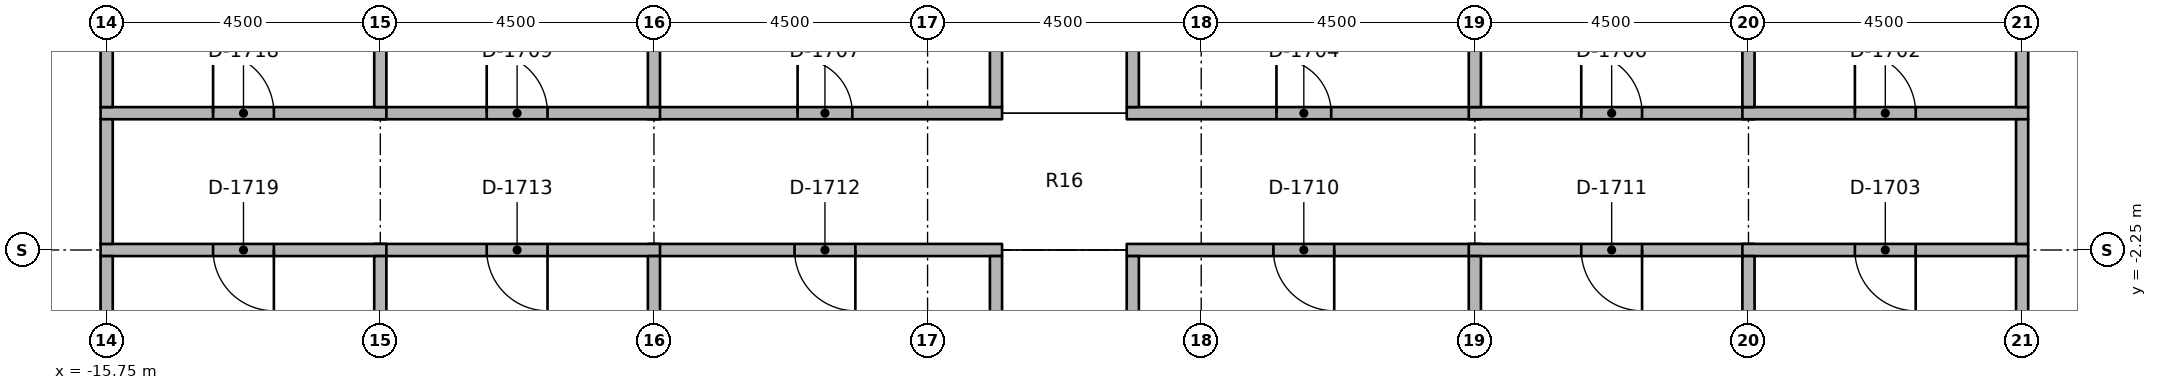
"""IFC4 building model, lengths in metres.
Left out: names, types, materials, properties, quantities, classifications, styles, units other than length and angle.
Written with IfcOpenShell. Run it as: python <this file> out.ifc"""

import sys

from ifc_helpers import new_model, si_unit, direction, frame, frame_2d, origin, place, context, subcontext, project, spatial, rectangle, extrude, element, fill, save


model = new_model("IFC4")
c1 = context("Model", 3, precision=1e-05, world=origin(), true_north=direction((0.0, 1.0)))
c2 = subcontext(c1, "Body", "Model", "MODEL_VIEW")
j1 = project(units=[si_unit("LENGTHUNIT", "METRE"), si_unit("PLANEANGLEUNIT", "RADIAN")], contexts=[c1])
p1 = place(None, origin())
s1 = spatial("IfcSite", under=j1, at=p1, CompositionType="ELEMENT")
p2 = place(p1, origin())
s2 = spatial("IfcBuilding", under=s1, at=p2, CompositionType="ELEMENT")
p3 = place(p2, frame((0.0, 0.0, 160.0)))
s3 = spatial("IfcBuildingStorey", under=s2, at=p3, CompositionType="ELEMENT", Elevation=160.0)
p4 = place(p3, frame((1.025, 0.0, 0.0), z_axis=(0.0, 0.0, 1.0), x_axis=(1.0, 0.0, 0.0)))
e1 = element("IfcWall", 1, at=p4, inside=s3, PredefinedType="PARTITIONING", context=c2, shape_type="SweptSolid", body=[
    extrude(rectangle(XDim=5.825, YDim=0.2, at=frame_2d((2.913, 0.0))), origin(), (0.0, 0.0, 1.0), 2.75),
])
p5 = place(p4, frame((2.462, 0.0, 0.0)))
e2 = element("IfcOpeningElement", 2, at=p5, cuts=e1, PredefinedType="OPENING", context=c2, shape_type="SweptSolid", body=[
    extrude(rectangle(XDim=0.9, YDim=2.1, at=frame_2d((0.45, 1.05))), frame((0.0, 0.11, 0.0), z_axis=(0.0, -1.0, 0.0), x_axis=(1.0, 0.0, 0.0)), (0.0, 0.0, 1.0), 0.22),
])
p6 = place(p3, frame((6.65, 0.0, 0.0), z_axis=(0.0, 0.0, 1.0), x_axis=(1.0, 0.0, 0.0)))
e3 = element("IfcWall", 3, at=p6, inside=s3, PredefinedType="PARTITIONING", context=c2, shape_type="SweptSolid", body=[
    extrude(rectangle(XDim=4.7, YDim=0.2, at=frame_2d((2.35, 0.0))), origin(), (0.0, 0.0, 1.0), 2.75),
])
p7 = place(p6, frame((1.85, 0.0, 0.0)))
e4 = element("IfcOpeningElement", 4, at=p7, cuts=e3, PredefinedType="OPENING", context=c2, shape_type="SweptSolid", body=[
    extrude(rectangle(XDim=1.0, YDim=2.1, at=frame_2d((0.5, 1.05))), frame((0.0, 0.11, 0.0), z_axis=(0.0, -1.0, 0.0), x_axis=(1.0, 0.0, 0.0)), (0.0, 0.0, 1.0), 0.22),
])
p8 = place(p3, frame((-6.85, 0.0, 0.0), z_axis=(0.0, 0.0, 1.0), x_axis=(1.0, 0.0, 0.0)))
e5 = element("IfcWall", 5, at=p8, inside=s3, PredefinedType="PARTITIONING", context=c2, shape_type="SweptSolid", body=[
    extrude(rectangle(XDim=5.825, YDim=0.2, at=frame_2d((2.913, 0.0))), origin(), (0.0, 0.0, 1.0), 2.75),
])
p9 = place(p8, frame((2.462, 0.0, 0.0)))
e6 = element("IfcOpeningElement", 6, at=p9, cuts=e5, PredefinedType="OPENING", context=c2, shape_type="SweptSolid", body=[
    extrude(rectangle(XDim=0.9, YDim=2.1, at=frame_2d((0.45, 1.05))), frame((0.0, 0.11, 0.0), z_axis=(0.0, -1.0, 0.0), x_axis=(1.0, 0.0, 0.0)), (0.0, 0.0, 1.0), 0.22),
])
p10 = place(p3, frame((-11.35, 0.0, 0.0), z_axis=(0.0, 0.0, 1.0), x_axis=(1.0, 0.0, 0.0)))
e7 = element("IfcWall", 7, at=p10, inside=s3, PredefinedType="PARTITIONING", context=c2, shape_type="SweptSolid", body=[
    extrude(rectangle(XDim=4.7, YDim=0.2, at=frame_2d((2.35, 0.0))), origin(), (0.0, 0.0, 1.0), 2.75),
])
p11 = place(p10, frame((1.85, 0.0, 0.0)))
e8 = element("IfcOpeningElement", 8, at=p11, cuts=e7, PredefinedType="OPENING", context=c2, shape_type="SweptSolid", body=[
    extrude(rectangle(XDim=1.0, YDim=2.1, at=frame_2d((0.5, 1.05))), frame((0.0, 0.11, 0.0), z_axis=(0.0, -1.0, 0.0), x_axis=(1.0, 0.0, 0.0)), (0.0, 0.0, 1.0), 0.22),
])
p12 = place(p3, frame((6.85, -2.25, 0.0), z_axis=(0.0, 0.0, 1.0), x_axis=(-1.0, 0.0, 0.0)))
e9 = element("IfcWall", 9, at=p12, inside=s3, PredefinedType="PARTITIONING", context=c2, shape_type="SweptSolid", body=[
    extrude(rectangle(XDim=5.825, YDim=0.2, at=frame_2d((2.913, 0.0))), origin(), (0.0, 0.0, 1.0), 2.75),
])
p13 = place(p12, frame((2.413, 0.0, 0.0)))
e10 = element("IfcOpeningElement", 10, at=p13, cuts=e9, PredefinedType="OPENING", context=c2, shape_type="SweptSolid", body=[
    extrude(rectangle(XDim=1.0, YDim=2.1, at=frame_2d((0.5, 1.05))), frame((0.0, 0.11, 0.0), z_axis=(0.0, -1.0, 0.0), x_axis=(1.0, 0.0, 0.0)), (0.0, 0.0, 1.0), 0.22),
])
p14 = place(p3, frame((11.35, -2.25, 0.0), z_axis=(0.0, 0.0, 1.0), x_axis=(-1.0, 0.0, 0.0)))
e11 = element("IfcWall", 11, at=p14, inside=s3, PredefinedType="PARTITIONING", context=c2, shape_type="SweptSolid", body=[
    extrude(rectangle(XDim=4.7, YDim=0.2, at=frame_2d((2.35, 0.0))), origin(), (0.0, 0.0, 1.0), 2.75),
])
p15 = place(p14, frame((1.85, 0.0, 0.0)))
e12 = element("IfcOpeningElement", 12, at=p15, cuts=e11, PredefinedType="OPENING", context=c2, shape_type="SweptSolid", body=[
    extrude(rectangle(XDim=1.0, YDim=2.1, at=frame_2d((0.5, 1.05))), frame((0.0, 0.11, 0.0), z_axis=(0.0, -1.0, 0.0), x_axis=(1.0, 0.0, 0.0)), (0.0, 0.0, 1.0), 0.22),
])
p16 = place(p3, frame((-1.025, -2.25, 0.0), z_axis=(0.0, 0.0, 1.0), x_axis=(-1.0, 0.0, 0.0)))
e13 = element("IfcWall", 13, at=p16, inside=s3, PredefinedType="PARTITIONING", context=c2, shape_type="SweptSolid", body=[
    extrude(rectangle(XDim=5.825, YDim=0.2, at=frame_2d((2.913, 0.0))), origin(), (0.0, 0.0, 1.0), 2.75),
])
p17 = place(p16, frame((2.413, 0.0, 0.0)))
e14 = element("IfcOpeningElement", 14, at=p17, cuts=e13, PredefinedType="OPENING", context=c2, shape_type="SweptSolid", body=[
    extrude(rectangle(XDim=1.0, YDim=2.1, at=frame_2d((0.5, 1.05))), frame((0.0, 0.11, 0.0), z_axis=(0.0, -1.0, 0.0), x_axis=(1.0, 0.0, 0.0)), (0.0, 0.0, 1.0), 0.22),
])
p18 = place(p3, frame((-6.65, -2.25, 0.0), z_axis=(0.0, 0.0, 1.0), x_axis=(-1.0, 0.0, 0.0)))
e15 = element("IfcWall", 15, at=p18, inside=s3, PredefinedType="PARTITIONING", context=c2, shape_type="SweptSolid", body=[
    extrude(rectangle(XDim=4.7, YDim=0.2, at=frame_2d((2.35, 0.0))), origin(), (0.0, 0.0, 1.0), 2.75),
])
p19 = place(p18, frame((1.85, 0.0, 0.0)))
e16 = element("IfcOpeningElement", 16, at=p19, cuts=e15, PredefinedType="OPENING", context=c2, shape_type="SweptSolid", body=[
    extrude(rectangle(XDim=1.0, YDim=2.1, at=frame_2d((0.5, 1.05))), frame((0.0, 0.11, 0.0), z_axis=(0.0, -1.0, 0.0), x_axis=(1.0, 0.0, 0.0)), (0.0, 0.0, 1.0), 0.22),
])
p20 = place(p3, frame((11.15, 0.0, 0.0), z_axis=(0.0, 0.0, 1.0), x_axis=(1.0, 0.0, 0.0)))
e17 = element("IfcWall", 17, at=p20, inside=s3, PredefinedType="PARTITIONING", context=c2, shape_type="SweptSolid", body=[
    extrude(rectangle(XDim=4.7, YDim=0.2, at=frame_2d((2.35, 0.0))), origin(), (0.0, 0.0, 1.0), 2.75),
])
p21 = place(p20, frame((1.85, 0.0, 0.0)))
e18 = element("IfcOpeningElement", 18, at=p21, cuts=e17, PredefinedType="OPENING", context=c2, shape_type="SweptSolid", body=[
    extrude(rectangle(XDim=1.0, YDim=2.1, at=frame_2d((0.5, 1.05))), frame((0.0, 0.11, 0.0), z_axis=(0.0, -1.0, 0.0), x_axis=(1.0, 0.0, 0.0)), (0.0, 0.0, 1.0), 0.22),
])
p22 = place(p3, frame((15.85, -2.25, 0.0), z_axis=(0.0, 0.0, 1.0), x_axis=(-1.0, 0.0, 0.0)))
e19 = element("IfcWall", 19, at=p22, inside=s3, PredefinedType="PARTITIONING", context=c2, shape_type="SweptSolid", body=[
    extrude(rectangle(XDim=4.7, YDim=0.2, at=frame_2d((2.35, 0.0))), origin(), (0.0, 0.0, 1.0), 2.75),
])
p23 = place(p22, frame((1.85, 0.0, 0.0)))
e20 = element("IfcOpeningElement", 20, at=p23, cuts=e19, PredefinedType="OPENING", context=c2, shape_type="SweptSolid", body=[
    extrude(rectangle(XDim=1.0, YDim=2.1, at=frame_2d((0.5, 1.05))), frame((0.0, 0.11, 0.0), z_axis=(0.0, -1.0, 0.0), x_axis=(1.0, 0.0, 0.0)), (0.0, 0.0, 1.0), 0.22),
])
p24 = place(p3, frame((15.75, -2.15, 0.0), z_axis=(0.0, 0.0, 1.0), x_axis=(0.0, 1.0, 0.0)))
e21 = element("IfcWall", 21, at=p24, inside=s3, PredefinedType="PARTITIONING", context=c2, shape_type="SweptSolid", body=[
    extrude(rectangle(XDim=2.05, YDim=0.2, at=frame_2d((1.025, 0.0))), origin(), (0.0, 0.0, 1.0), 2.75),
])
p25 = place(p3, frame((-15.85, 0.0, 0.0), z_axis=(0.0, 0.0, 1.0), x_axis=(1.0, 0.0, 0.0)))
e22 = element("IfcWall", 22, at=p25, inside=s3, PredefinedType="PARTITIONING", context=c2, shape_type="SweptSolid", body=[
    extrude(rectangle(XDim=4.7, YDim=0.2, at=frame_2d((2.35, 0.0))), origin(), (0.0, 0.0, 1.0), 2.75),
])
p26 = place(p25, frame((1.85, 0.0, 0.0)))
e23 = element("IfcOpeningElement", 23, at=p26, cuts=e22, PredefinedType="OPENING", context=c2, shape_type="SweptSolid", body=[
    extrude(rectangle(XDim=1.0, YDim=2.1, at=frame_2d((0.5, 1.05))), frame((0.0, 0.11, 0.0), z_axis=(0.0, -1.0, 0.0), x_axis=(1.0, 0.0, 0.0)), (0.0, 0.0, 1.0), 0.22),
])
p27 = place(p3, frame((-11.15, -2.25, 0.0), z_axis=(0.0, 0.0, 1.0), x_axis=(-1.0, 0.0, 0.0)))
e24 = element("IfcWall", 24, at=p27, inside=s3, PredefinedType="PARTITIONING", context=c2, shape_type="SweptSolid", body=[
    extrude(rectangle(XDim=4.7, YDim=0.2, at=frame_2d((2.35, 0.0))), origin(), (0.0, 0.0, 1.0), 2.75),
])
p28 = place(p27, frame((1.85, 0.0, 0.0)))
e25 = element("IfcOpeningElement", 25, at=p28, cuts=e24, PredefinedType="OPENING", context=c2, shape_type="SweptSolid", body=[
    extrude(rectangle(XDim=1.0, YDim=2.1, at=frame_2d((0.5, 1.05))), frame((0.0, 0.11, 0.0), z_axis=(0.0, -1.0, 0.0), x_axis=(1.0, 0.0, 0.0)), (0.0, 0.0, 1.0), 0.22),
])
p29 = place(p3, frame((-15.75, -2.15, 0.0), z_axis=(0.0, 0.0, 1.0), x_axis=(0.0, 1.0, 0.0)))
e26 = element("IfcWall", 26, at=p29, inside=s3, PredefinedType="PARTITIONING", context=c2, shape_type="SweptSolid", body=[
    extrude(rectangle(XDim=2.05, YDim=0.2, at=frame_2d((1.025, 0.0))), origin(), (0.0, 0.0, 1.0), 2.75),
])
for number, where, z_axis, x_axis in (
    (27, (1.125, 0.1, 0.0), (0.0, 0.0, 1.0), (0.0, 1.0, 0.0)),
    (28, (-1.125, 0.1, 0.0), (0.0, 0.0, 1.0), (0.0, 1.0, 0.0)),
):
    element("IfcWall", number, at=place(p3, frame(where, z_axis=z_axis, x_axis=x_axis)), inside=s3, PredefinedType="PARTITIONING", context=c2, shape_type="SweptSolid", body=[
        extrude(rectangle(XDim=3.3, YDim=0.2, at=frame_2d((1.65, 0.0))), origin(), (0.0, 0.0, 1.0), 2.75),
    ])
for number, where, z_axis, x_axis in (
    (29, (1.125, -6.65, 0.0), (0.0, 0.0, 1.0), (0.0, 1.0, 0.0)),
    (30, (-1.125, -6.65, 0.0), (0.0, 0.0, 1.0), (0.0, 1.0, 0.0)),
):
    element("IfcWall", number, at=place(p3, frame(where, z_axis=z_axis, x_axis=x_axis)), inside=s3, PredefinedType="PARTITIONING", context=c2, shape_type="SweptSolid", body=[
        extrude(rectangle(XDim=4.3, YDim=0.2, at=frame_2d((2.15, 0.0))), origin(), (0.0, 0.0, 1.0), 2.75),
    ])
p30 = place(p3, frame((6.75, 0.1, 0.0), z_axis=(0.0, 0.0, 1.0), x_axis=(0.0, 1.0, 0.0)))
e31 = element("IfcWall", 31, at=p30, inside=s3, PredefinedType="PARTITIONING", context=c2, shape_type="SweptSolid", body=[
    extrude(rectangle(XDim=3.3, YDim=0.2, at=frame_2d((1.65, 0.0))), origin(), (0.0, 0.0, 1.0), 2.75),
])
p31 = place(p3, frame((11.25, 0.1, 0.0), z_axis=(0.0, 0.0, 1.0), x_axis=(0.0, 1.0, 0.0)))
e32 = element("IfcWall", 32, at=p31, inside=s3, PredefinedType="PARTITIONING", context=c2, shape_type="SweptSolid", body=[
    extrude(rectangle(XDim=6.07, YDim=0.2, at=frame_2d((3.035, 0.0))), origin(), (0.0, 0.0, 1.0), 2.75),
])
p32 = place(p3, frame((-6.75, 0.1, 0.0), z_axis=(0.0, 0.0, 1.0), x_axis=(0.0, 1.0, 0.0)))
e33 = element("IfcWall", 33, at=p32, inside=s3, PredefinedType="PARTITIONING", context=c2, shape_type="SweptSolid", body=[
    extrude(rectangle(XDim=3.3, YDim=0.2, at=frame_2d((1.65, 0.0))), origin(), (0.0, 0.0, 1.0), 2.75),
])
p33 = place(p3, frame((-11.25, 0.1, 0.0), z_axis=(0.0, 0.0, 1.0), x_axis=(0.0, 1.0, 0.0)))
e34 = element("IfcWall", 34, at=p33, inside=s3, PredefinedType="PARTITIONING", context=c2, shape_type="SweptSolid", body=[
    extrude(rectangle(XDim=6.07, YDim=0.2, at=frame_2d((3.035, 0.0))), origin(), (0.0, 0.0, 1.0), 2.75),
])
p34 = place(p3, frame((6.75, -6.65, 0.0), z_axis=(0.0, 0.0, 1.0), x_axis=(0.0, 1.0, 0.0)))
e35 = element("IfcWall", 35, at=p34, inside=s3, PredefinedType="PARTITIONING", context=c2, shape_type="SweptSolid", body=[
    extrude(rectangle(XDim=4.3, YDim=0.2, at=frame_2d((2.15, 0.0))), origin(), (0.0, 0.0, 1.0), 2.75),
])
p35 = place(p3, frame((11.25, -6.17, 0.0), z_axis=(0.0, 0.0, 1.0), x_axis=(0.0, 1.0, 0.0)))
e36 = element("IfcWall", 36, at=p35, inside=s3, PredefinedType="PARTITIONING", context=c2, shape_type="SweptSolid", body=[
    extrude(rectangle(XDim=3.82, YDim=0.2, at=frame_2d((1.91, 0.0))), origin(), (0.0, 0.0, 1.0), 2.75),
])
for number, where, z_axis, x_axis in (
    (37, (-6.75, -6.65, 0.0), (0.0, 0.0, 1.0), (0.0, 1.0, 0.0)),
    (38, (-11.25, -6.65, 0.0), (0.0, 0.0, 1.0), (0.0, 1.0, 0.0)),
):
    element("IfcWall", number, at=place(p3, frame(where, z_axis=z_axis, x_axis=x_axis)), inside=s3, PredefinedType="PARTITIONING", context=c2, shape_type="SweptSolid", body=[
        extrude(rectangle(XDim=4.3, YDim=0.2, at=frame_2d((2.15, 0.0))), origin(), (0.0, 0.0, 1.0), 2.75),
    ])
p36 = place(p3, frame((15.75, 5.85, 0.0), z_axis=(0.0, 0.0, 1.0), x_axis=(0.0, -1.0, 0.0)))
e39 = element("IfcWall", 39, at=p36, inside=s3, PredefinedType="PARTITIONING", context=c2, shape_type="SweptSolid", body=[
    extrude(rectangle(XDim=5.75, YDim=0.2, at=frame_2d((2.875, 0.0))), origin(), (0.0, 0.0, 1.0), 2.75),
])
p37 = place(p36, frame((1.975, 0.0, 0.0)))
e40 = element("IfcOpeningElement", 40, at=p37, cuts=e39, PredefinedType="OPENING", context=c2, shape_type="SweptSolid", body=[
    extrude(rectangle(XDim=1.8, YDim=2.1, at=frame_2d((0.9, 1.05))), frame((0.0, 0.11, 0.0), z_axis=(0.0, -1.0, 0.0), x_axis=(1.0, 0.0, 0.0)), (0.0, 0.0, 1.0), 0.22),
])
p38 = place(p3, frame((15.75, -5.85, 0.0), z_axis=(0.0, 0.0, 1.0), x_axis=(0.0, 1.0, 0.0)))
e41 = element("IfcWall", 41, at=p38, inside=s3, PredefinedType="PARTITIONING", context=c2, shape_type="SweptSolid", body=[
    extrude(rectangle(XDim=3.5, YDim=0.2, at=frame_2d((1.75, 0.0))), origin(), (0.0, 0.0, 1.0), 2.75),
])
p39 = place(p3, frame((-15.75, 0.1, 0.0), z_axis=(0.0, 0.0, 1.0), x_axis=(0.0, 1.0, 0.0)))
e42 = element("IfcWall", 42, at=p39, inside=s3, PredefinedType="PARTITIONING", context=c2, shape_type="SweptSolid", body=[
    extrude(rectangle(XDim=5.75, YDim=0.2, at=frame_2d((2.875, 0.0))), origin(), (0.0, 0.0, 1.0), 2.75),
])
p40 = place(p39, frame((1.975, 0.0, 0.0)))
e43 = element("IfcOpeningElement", 43, at=p40, cuts=e42, PredefinedType="OPENING", context=c2, shape_type="SweptSolid", body=[
    extrude(rectangle(XDim=1.8, YDim=2.1, at=frame_2d((0.9, 1.05))), frame((0.0, 0.11, 0.0), z_axis=(0.0, -1.0, 0.0), x_axis=(1.0, 0.0, 0.0)), (0.0, 0.0, 1.0), 0.22),
])
p41 = place(p3, frame((-15.75, -5.85, 0.0), z_axis=(0.0, 0.0, 1.0), x_axis=(0.0, 1.0, 0.0)))
e44 = element("IfcWall", 44, at=p41, inside=s3, PredefinedType="PARTITIONING", context=c2, shape_type="SweptSolid", body=[
    extrude(rectangle(XDim=3.5, YDim=0.2, at=frame_2d((1.75, 0.0))), origin(), (0.0, 0.0, 1.0), 2.75),
])
p42 = place(p21, origin())
e45 = element("IfcDoor", 45, at=p42, inside=s3, OperationType="SINGLE_SWING_RIGHT", PredefinedType="DOOR", context=c2, shape_type="SweptSolid", body=[
    extrude(rectangle(XDim=1.0, YDim=2.1, at=frame_2d((0.5, 1.05))), frame((0.0, 0.025, 0.0), z_axis=(0.0, -1.0, 0.0), x_axis=(1.0, 0.0, 0.0)), (0.0, 0.0, 1.0), 0.05),
])
fill(e18, e45)
p43 = place(p23, origin())
e46 = element("IfcDoor", 46, at=p43, inside=s3, OperationType="SINGLE_SWING_RIGHT", PredefinedType="DOOR", context=c2, shape_type="SweptSolid", body=[
    extrude(rectangle(XDim=1.0, YDim=2.1, at=frame_2d((0.5, 1.05))), frame((0.0, 0.025, 0.0), z_axis=(0.0, -1.0, 0.0), x_axis=(1.0, 0.0, 0.0)), (0.0, 0.0, 1.0), 0.05),
])
fill(e20, e46)
p44 = place(p5, origin())
e47 = element("IfcDoor", 47, at=p44, inside=s3, OperationType="SINGLE_SWING_RIGHT", PredefinedType="DOOR", context=c2, shape_type="SweptSolid", body=[
    extrude(rectangle(XDim=0.9, YDim=2.1, at=frame_2d((0.45, 1.05))), frame((0.0, 0.025, 0.0), z_axis=(0.0, -1.0, 0.0), x_axis=(1.0, 0.0, 0.0)), (0.0, 0.0, 1.0), 0.05),
])
fill(e2, e47)
p45 = place(p7, origin())
e48 = element("IfcDoor", 48, at=p45, inside=s3, OperationType="SINGLE_SWING_RIGHT", PredefinedType="DOOR", context=c2, shape_type="SweptSolid", body=[
    extrude(rectangle(XDim=1.0, YDim=2.1, at=frame_2d((0.5, 1.05))), frame((0.0, 0.025, 0.0), z_axis=(0.0, -1.0, 0.0), x_axis=(1.0, 0.0, 0.0)), (0.0, 0.0, 1.0), 0.05),
])
fill(e4, e48)
p46 = place(p9, origin())
e49 = element("IfcDoor", 49, at=p46, inside=s3, OperationType="SINGLE_SWING_RIGHT", PredefinedType="DOOR", context=c2, shape_type="SweptSolid", body=[
    extrude(rectangle(XDim=0.9, YDim=2.1, at=frame_2d((0.45, 1.05))), frame((0.0, 0.025, 0.0), z_axis=(0.0, -1.0, 0.0), x_axis=(1.0, 0.0, 0.0)), (0.0, 0.0, 1.0), 0.05),
])
fill(e6, e49)
p47 = place(p11, origin())
e50 = element("IfcDoor", 50, at=p47, inside=s3, OperationType="SINGLE_SWING_RIGHT", PredefinedType="DOOR", context=c2, shape_type="SweptSolid", body=[
    extrude(rectangle(XDim=1.0, YDim=2.1, at=frame_2d((0.5, 1.05))), frame((0.0, 0.025, 0.0), z_axis=(0.0, -1.0, 0.0), x_axis=(1.0, 0.0, 0.0)), (0.0, 0.0, 1.0), 0.05),
])
fill(e8, e50)
p48 = place(p13, origin())
e51 = element("IfcDoor", 51, at=p48, inside=s3, OperationType="SINGLE_SWING_RIGHT", PredefinedType="DOOR", context=c2, shape_type="SweptSolid", body=[
    extrude(rectangle(XDim=1.0, YDim=2.1, at=frame_2d((0.5, 1.05))), frame((0.0, 0.025, 0.0), z_axis=(0.0, -1.0, 0.0), x_axis=(1.0, 0.0, 0.0)), (0.0, 0.0, 1.0), 0.05),
])
fill(e10, e51)
p49 = place(p15, origin())
e52 = element("IfcDoor", 52, at=p49, inside=s3, OperationType="SINGLE_SWING_RIGHT", PredefinedType="DOOR", context=c2, shape_type="SweptSolid", body=[
    extrude(rectangle(XDim=1.0, YDim=2.1, at=frame_2d((0.5, 1.05))), frame((0.0, 0.025, 0.0), z_axis=(0.0, -1.0, 0.0), x_axis=(1.0, 0.0, 0.0)), (0.0, 0.0, 1.0), 0.05),
])
fill(e12, e52)
p50 = place(p17, origin())
e53 = element("IfcDoor", 53, at=p50, inside=s3, OperationType="SINGLE_SWING_RIGHT", PredefinedType="DOOR", context=c2, shape_type="SweptSolid", body=[
    extrude(rectangle(XDim=1.0, YDim=2.1, at=frame_2d((0.5, 1.05))), frame((0.0, 0.025, 0.0), z_axis=(0.0, -1.0, 0.0), x_axis=(1.0, 0.0, 0.0)), (0.0, 0.0, 1.0), 0.05),
])
fill(e14, e53)
p51 = place(p19, origin())
e54 = element("IfcDoor", 54, at=p51, inside=s3, OperationType="SINGLE_SWING_RIGHT", PredefinedType="DOOR", context=c2, shape_type="SweptSolid", body=[
    extrude(rectangle(XDim=1.0, YDim=2.1, at=frame_2d((0.5, 1.05))), frame((0.0, 0.025, 0.0), z_axis=(0.0, -1.0, 0.0), x_axis=(1.0, 0.0, 0.0)), (0.0, 0.0, 1.0), 0.05),
])
fill(e16, e54)
p52 = place(p26, origin())
e55 = element("IfcDoor", 55, at=p52, inside=s3, OperationType="SINGLE_SWING_RIGHT", PredefinedType="DOOR", context=c2, shape_type="SweptSolid", body=[
    extrude(rectangle(XDim=1.0, YDim=2.1, at=frame_2d((0.5, 1.05))), frame((0.0, 0.025, 0.0), z_axis=(0.0, -1.0, 0.0), x_axis=(1.0, 0.0, 0.0)), (0.0, 0.0, 1.0), 0.05),
])
fill(e23, e55)
p53 = place(p28, origin())
e56 = element("IfcDoor", 56, at=p53, inside=s3, OperationType="SINGLE_SWING_RIGHT", PredefinedType="DOOR", context=c2, shape_type="SweptSolid", body=[
    extrude(rectangle(XDim=1.0, YDim=2.1, at=frame_2d((0.5, 1.05))), frame((0.0, 0.025, 0.0), z_axis=(0.0, -1.0, 0.0), x_axis=(1.0, 0.0, 0.0)), (0.0, 0.0, 1.0), 0.05),
])
fill(e25, e56)
save(model, sys.argv[1])
